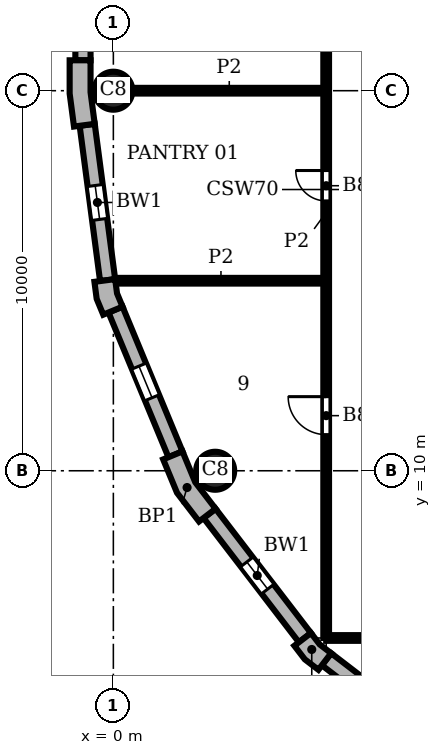
"""IFC4 building model, lengths in metres.
Left out: names, types, materials, properties, quantities, classifications, styles, units other than length and angle.
Written with IfcOpenShell. Run it as: python <this file> out.ifc"""

import sys

from ifc_helpers import new_model, si_unit, direction, frame, frame_2d, origin, origin_2d, place, context, subcontext, project, spatial, polyline, rectangle, circle, outline, extrude, element, fill, save


model = new_model("IFC4")
c1 = context("Model", 3, precision=1e-05, world=origin(), true_north=direction((0.0, 1.0)))
c2 = subcontext(c1, "Body", "Model", "MODEL_VIEW")
j1 = project(units=[si_unit("LENGTHUNIT", "METRE"), si_unit("PLANEANGLEUNIT", "RADIAN")], contexts=[c1])
p1 = place(None, origin())
s1 = spatial("IfcSite", under=j1, at=p1, CompositionType="ELEMENT")
p2 = place(p1, origin())
s2 = spatial("IfcBuilding", under=s1, at=p2, CompositionType="ELEMENT")
p3 = place(p2, frame((0.0, 0.0, 213.6)))
s3 = spatial("IfcBuildingStorey", under=s2, at=p3, CompositionType="ELEMENT", Elevation=213.6)
for number, where, z_axis, x_axis in (
    (1, (0.0, 20.0, 0.0), (0.0, 0.0, 1.0), (1.0, 0.0, 0.0)),
    (2, (2.679, 10.0, 0.0), (0.0, 0.0, 1.0), (1.0, 0.0, 0.0)),
):
    element("IfcColumn", number, at=place(p3, frame(where, z_axis=z_axis, x_axis=x_axis)), inside=s3, PredefinedType="COLUMN", context=c2, shape_type="SweptSolid", body=[
        extrude(circle(Radius=0.5, at=origin_2d()), origin(), (0.0, 0.0, 1.0), 3.9),
    ])
p4 = place(p3, origin())
e3 = element("IfcWall", 3, at=p4, inside=s3, PredefinedType="SOLIDWALL", context=c2, shape_type="SweptSolid", body=[
    extrude(outline(polyline([(-1.0, 20.8), (-1.15, 20.8), (-1.15, 19.925), (-1.036, 19.057), (-0.887, 19.076), (-0.49, 19.128), (-0.6, 19.961), (-0.6, 20.8), (-1.0, 20.8)])), origin(), (0.0, 0.0, 1.0), 3.9),
])
e4 = element("IfcWall", 4, at=p4, inside=s3, PredefinedType="SOLIDWALL", context=c2, shape_type="SweptSolid", body=[
    extrude(outline(polyline([(-0.349, 14.99), (-0.498, 14.971), (-0.439, 14.523), (-0.266, 14.106), (-0.128, 14.164), (0.242, 14.317), (0.097, 14.667), (0.047, 15.043), (-0.349, 14.99)])), origin(), (0.0, 0.0, 1.0), 3.9),
])
e5 = element("IfcWall", 5, at=p4, inside=s3, PredefinedType="SOLIDWALL", context=c2, shape_type="SweptSolid", body=[
    extrude(outline(polyline([(1.449, 10.356), (1.311, 10.299), (1.675, 9.42), (2.254, 8.665), (2.373, 8.757), (2.69, 9.0), (2.155, 9.698), (1.819, 10.51), (1.449, 10.356)])), origin(), (0.0, 0.0, 1.0), 3.9),
])
e6 = element("IfcWall", 6, at=p4, inside=s3, PredefinedType="SOLIDWALL", context=c2, shape_type="SweptSolid", body=[
    extrude(outline(polyline([(4.882, 5.487), (4.763, 5.396), (5.038, 5.038), (5.396, 4.763), (5.487, 4.882), (5.731, 5.199), (5.43, 5.43), (5.199, 5.731), (4.882, 5.487)])), origin(), (0.0, 0.0, 1.0), 3.9),
])
p5 = place(p3, frame((-0.8, 39.2, 0.0), z_axis=(0.0, 0.0, 1.0), x_axis=(0.0, -1.0, 0.0)))
e7 = element("IfcWall", 7, at=p5, inside=s3, PredefinedType="SOLIDWALL", context=c2, shape_type="SweptSolid", body=[
    extrude(rectangle(XDim=18.4, YDim=0.4, at=frame_2d((9.2, 0.0))), origin(), (0.0, 0.0, 1.0), 3.9),
])
p6 = place(p5, frame((3.75, 0.0, 0.9)))
e8 = element("IfcOpeningElement", 8, at=p6, cuts=e7, PredefinedType="OPENING", context=c2, shape_type="SweptSolid", body=[
    extrude(rectangle(XDim=0.9, YDim=2.35, at=frame_2d((0.45, 1.175))), frame((0.0, 0.21, 0.0), z_axis=(0.0, -1.0, 0.0), x_axis=(1.0, 0.0, 0.0)), (0.0, 0.0, 1.0), 0.42),
])
p7 = place(p5, frame((13.75, 0.0, 0.9)))
e9 = element("IfcOpeningElement", 9, at=p7, cuts=e7, PredefinedType="OPENING", context=c2, shape_type="SweptSolid", body=[
    extrude(rectangle(XDim=0.9, YDim=2.35, at=frame_2d((0.45, 1.175))), frame((0.0, 0.21, 0.0), z_axis=(0.0, -1.0, 0.0), x_axis=(1.0, 0.0, 0.0)), (0.0, 0.0, 1.0), 0.42),
])
p8 = place(p3, frame((-0.689, 19.102, 0.0), z_axis=(0.0, 0.0, 1.0), x_axis=(0.130514280502, -0.991446429508, 0.0)))
e10 = element("IfcWall", 10, at=p8, inside=s3, PredefinedType="SOLIDWALL", context=c2, shape_type="SweptSolid", body=[
    extrude(rectangle(XDim=4.121, YDim=0.4, at=frame_2d((2.061, 0.0))), origin(), (0.0, 0.0, 1.0), 3.9),
])
p9 = place(p8, frame((1.611, 0.0, 0.9)))
e11 = element("IfcOpeningElement", 11, at=p9, cuts=e10, PredefinedType="OPENING", context=c2, shape_type="SweptSolid", body=[
    extrude(rectangle(XDim=0.9, YDim=2.35, at=frame_2d((0.45, 1.175))), frame((0.0, 0.21, 0.0), z_axis=(0.0, -1.0, 0.0), x_axis=(1.0, 0.0, 0.0)), (0.0, 0.0, 1.0), 0.42),
])
p10 = place(p3, frame((0.057, 14.24, 0.0), z_axis=(0.0, 0.0, 1.0), x_axis=(0.382721546029, -0.923863744394, 0.0)))
e12 = element("IfcWall", 12, at=p10, inside=s3, PredefinedType="SOLIDWALL", context=c2, shape_type="SweptSolid", body=[
    extrude(rectangle(XDim=4.121, YDim=0.4, at=frame_2d((2.061, 0.0))), origin(), (0.0, 0.0, 1.0), 3.9),
])
p11 = place(p10, frame((1.611, 0.0, 0.9)))
e13 = element("IfcOpeningElement", 13, at=p11, cuts=e12, PredefinedType="OPENING", context=c2, shape_type="SweptSolid", body=[
    extrude(rectangle(XDim=0.9, YDim=2.35, at=frame_2d((0.45, 1.175))), frame((0.0, 0.21, 0.0), z_axis=(0.0, -1.0, 0.0), x_axis=(1.0, 0.0, 0.0)), (0.0, 0.0, 1.0), 0.42),
])
p12 = place(p3, frame((2.532, 8.878, 0.0), z_axis=(0.0, 0.0, 1.0), x_axis=(0.608759824817, -0.793354571229, 0.0)))
e14 = element("IfcWall", 14, at=p12, inside=s3, PredefinedType="SOLIDWALL", context=c2, shape_type="SweptSolid", body=[
    extrude(rectangle(XDim=4.121, YDim=0.4, at=frame_2d((2.061, 0.0))), origin(), (0.0, 0.0, 1.0), 3.9),
])
p13 = place(p12, frame((1.611, 0.0, 0.9)))
e15 = element("IfcOpeningElement", 15, at=p13, cuts=e14, PredefinedType="OPENING", context=c2, shape_type="SweptSolid", body=[
    extrude(rectangle(XDim=0.9, YDim=2.35, at=frame_2d((0.45, 1.175))), frame((0.0, 0.21, 0.0), z_axis=(0.0, -1.0, 0.0), x_axis=(1.0, 0.0, 0.0)), (0.0, 0.0, 1.0), 0.42),
])
p14 = place(p3, frame((5.609, 5.041, 0.0), z_axis=(0.0, 0.0, 1.0), x_axis=(0.793354571229, -0.608759824817, 0.0)))
e16 = element("IfcWall", 16, at=p14, inside=s3, PredefinedType="SOLIDWALL", context=c2, shape_type="SweptSolid", body=[
    extrude(rectangle(XDim=4.121, YDim=0.4, at=frame_2d((2.061, 0.0))), origin(), (0.0, 0.0, 1.0), 3.9),
])
p15 = place(p14, frame((1.611, 0.0, 0.9)))
e17 = element("IfcOpeningElement", 17, at=p15, cuts=e16, PredefinedType="OPENING", context=c2, shape_type="SweptSolid", body=[
    extrude(rectangle(XDim=0.9, YDim=2.35, at=frame_2d((0.45, 1.175))), frame((0.0, 0.21, 0.0), z_axis=(0.0, -1.0, 0.0), x_axis=(1.0, 0.0, 0.0)), (0.0, 0.0, 1.0), 0.42),
])
p16 = place(p3, frame((5.6, 5.6, 0.0), z_axis=(0.0, 0.0, 1.0), x_axis=(0.0, 1.0, 0.0)))
e18 = element("IfcWall", 18, at=p16, inside=s3, PredefinedType="PARTITIONING", context=c2, shape_type="SweptSolid", body=[
    extrude(rectangle(XDim=22.4, YDim=0.15, at=frame_2d((11.2, 0.0))), origin(), (0.0, 0.0, 1.0), 3.58),
])
p17 = place(p16, frame((5.35, 0.0, 0.0)))
e19 = element("IfcOpeningElement", 19, at=p17, cuts=e18, PredefinedType="OPENING", context=c2, shape_type="SweptSolid", body=[
    extrude(rectangle(XDim=1.0, YDim=2.1, at=frame_2d((0.5, 1.05))), frame((0.0, 0.085, 0.0), z_axis=(0.0, -1.0, 0.0), x_axis=(1.0, 0.0, 0.0)), (0.0, 0.0, 1.0), 0.17),
])
p18 = place(p16, frame((11.5, 0.0, 0.0)))
e20 = element("IfcOpeningElement", 20, at=p18, cuts=e18, PredefinedType="OPENING", context=c2, shape_type="SweptSolid", body=[
    extrude(rectangle(XDim=0.8, YDim=2.1, at=frame_2d((0.4, 1.05))), frame((0.0, 0.085, 0.0), z_axis=(0.0, -1.0, 0.0), x_axis=(1.0, 0.0, 0.0)), (0.0, 0.0, 1.0), 0.17),
])
p19 = place(p16, frame((17.5, 0.0, 0.0)))
e21 = element("IfcOpeningElement", 21, at=p19, cuts=e18, PredefinedType="OPENING", context=c2, shape_type="SweptSolid", body=[
    extrude(rectangle(XDim=1.8, YDim=2.1, at=frame_2d((0.9, 1.05))), frame((0.0, 0.085, 0.0), z_axis=(0.0, -1.0, 0.0), x_axis=(1.0, 0.0, 0.0)), (0.0, 0.0, 1.0), 0.17),
])
p20 = place(p3, frame((5.6, 5.6, 0.0), z_axis=(0.0, 0.0, 1.0), x_axis=(1.0, 0.0, 0.0)))
e22 = element("IfcWall", 22, at=p20, inside=s3, PredefinedType="PARTITIONING", context=c2, shape_type="SweptSolid", body=[
    extrude(rectangle(XDim=25.4, YDim=0.15, at=frame_2d((12.7, 0.0))), origin(), (0.0, 0.0, 1.0), 3.58),
])
p21 = place(p20, frame((10.85, 0.0, 0.0)))
e23 = element("IfcOpeningElement", 23, at=p21, cuts=e22, PredefinedType="OPENING", context=c2, shape_type="SweptSolid", body=[
    extrude(rectangle(XDim=1.8, YDim=2.1, at=frame_2d((0.9, 1.05))), frame((0.0, 0.085, 0.0), z_axis=(0.0, -1.0, 0.0), x_axis=(1.0, 0.0, 0.0)), (0.0, 0.0, 1.0), 0.17),
])
p22 = place(p3, frame((0.063, 15.0, 0.0), z_axis=(0.0, 0.0, 1.0), x_axis=(1.0, 0.0, 0.0)))
e24 = element("IfcWall", 24, at=p22, inside=s3, PredefinedType="PARTITIONING", context=c2, shape_type="SweptSolid", body=[
    extrude(rectangle(XDim=5.537, YDim=0.15, at=frame_2d((2.769, 0.0))), origin(), (0.0, 0.0, 1.0), 3.58),
])
p23 = place(p3, frame((0.5, 20.0, 0.0), z_axis=(0.0, 0.0, 1.0), x_axis=(1.0, 0.0, 0.0)))
e25 = element("IfcWall", 25, at=p23, inside=s3, PredefinedType="PARTITIONING", context=c2, shape_type="SweptSolid", body=[
    extrude(rectangle(XDim=5.1, YDim=0.15, at=frame_2d((2.55, 0.0))), origin(), (0.0, 0.0, 1.0), 3.58),
])
p24 = place(p9, origin())
e26 = element("IfcWindow", 26, at=p24, inside=s3, PartitioningType="SINGLE_PANEL", PredefinedType="WINDOW", context=c2, shape_type="SweptSolid", body=[
    extrude(rectangle(XDim=0.9, YDim=2.35, at=frame_2d((0.45, 1.175))), frame((0.0, 0.16, 0.0), z_axis=(0.0, -1.0, 0.0), x_axis=(1.0, 0.0, 0.0)), (0.0, 0.0, 1.0), 0.06),
])
fill(e11, e26)
p25 = place(p11, origin())
e27 = element("IfcWindow", 27, at=p25, inside=s3, PartitioningType="SINGLE_PANEL", PredefinedType="WINDOW", context=c2, shape_type="SweptSolid", body=[
    extrude(rectangle(XDim=0.9, YDim=2.35, at=frame_2d((0.45, 1.175))), frame((0.0, 0.16, 0.0), z_axis=(0.0, -1.0, 0.0), x_axis=(1.0, 0.0, 0.0)), (0.0, 0.0, 1.0), 0.06),
])
fill(e13, e27)
p26 = place(p13, origin())
e28 = element("IfcWindow", 28, at=p26, inside=s3, PartitioningType="SINGLE_PANEL", PredefinedType="WINDOW", context=c2, shape_type="SweptSolid", body=[
    extrude(rectangle(XDim=0.9, YDim=2.35, at=frame_2d((0.45, 1.175))), frame((0.0, 0.16, 0.0), z_axis=(0.0, -1.0, 0.0), x_axis=(1.0, 0.0, 0.0)), (0.0, 0.0, 1.0), 0.06),
])
fill(e15, e28)
p27 = place(p17, origin())
e29 = element("IfcDoor", 29, at=p27, inside=s3, OperationType="SINGLE_SWING_RIGHT", PredefinedType="DOOR", context=c2, shape_type="SweptSolid", body=[
    extrude(rectangle(XDim=1.0, YDim=2.1, at=frame_2d((0.5, 1.05))), frame((0.0, 0.025, 0.0), z_axis=(0.0, -1.0, 0.0), x_axis=(1.0, 0.0, 0.0)), (0.0, 0.0, 1.0), 0.05),
])
fill(e19, e29)
p28 = place(p18, origin())
e30 = element("IfcDoor", 30, at=p28, inside=s3, OperationType="SINGLE_SWING_RIGHT", PredefinedType="DOOR", context=c2, shape_type="SweptSolid", body=[
    extrude(rectangle(XDim=0.8, YDim=2.1, at=frame_2d((0.4, 1.05))), frame((0.0, 0.025, 0.0), z_axis=(0.0, -1.0, 0.0), x_axis=(1.0, 0.0, 0.0)), (0.0, 0.0, 1.0), 0.05),
])
fill(e20, e30)
save(model, sys.argv[1])
